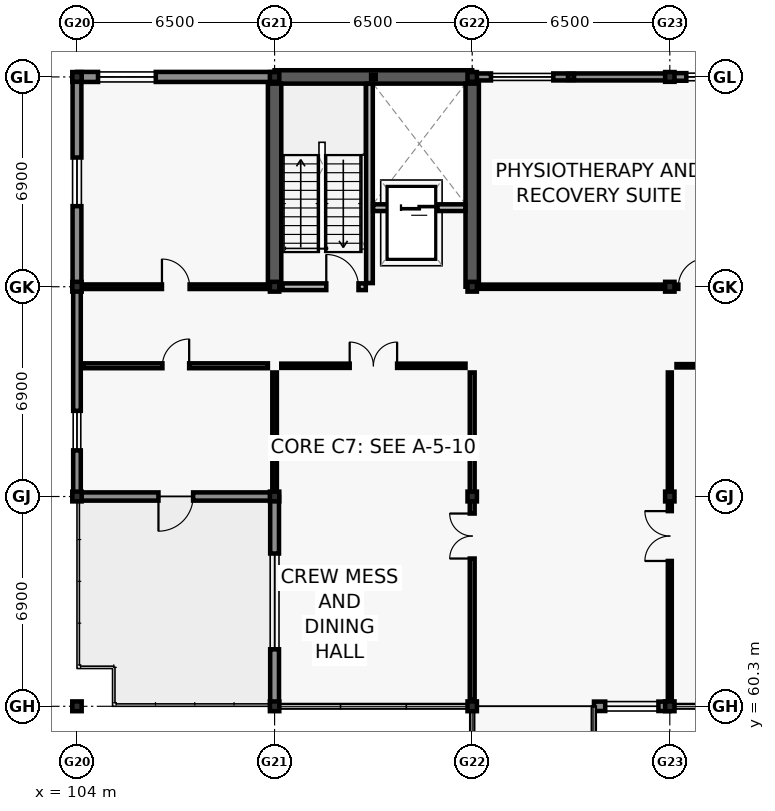
"""IFC4 building model, lengths in metres.
Left out: names, types, materials, properties, quantities, classifications, styles, units other than length and angle.
Written with IfcOpenShell. Run it as: python <this file> out.ifc"""

import sys

from ifc_helpers import new_model, si_unit, direction, frame, frame_2d, origin, origin_2d, place, context, subcontext, project, spatial, rectangle, hollow_rectangle, i_section, extrude, element, fill, save


model = new_model("IFC4")
c1 = context("Model", 3, precision=1e-05, world=origin(), true_north=direction((0.0, 1.0)))
c2 = subcontext(c1, "Body", "Model", "MODEL_VIEW")
j1 = project(units=[si_unit("LENGTHUNIT", "METRE"), si_unit("PLANEANGLEUNIT", "RADIAN")], contexts=[c1])
p1 = place(None, origin())
s1 = spatial("IfcSite", under=j1, at=p1, CompositionType="ELEMENT")
p2 = place(p1, origin())
s2 = spatial("IfcBuilding", under=s1, at=p2, CompositionType="ELEMENT")
p3 = place(p2, frame((0.0, 0.0, 5.4)))
s3 = spatial("IfcBuildingStorey", under=s2, at=p3, CompositionType="ELEMENT", Elevation=5.4)
for number, where, z_axis, x_axis in (
    (1, (104.0, 60.3, 0.0), (0.0, 0.0, 1.0), (1.0, 0.0, 0.0)),
    (2, (104.0, 67.2, 0.0), (0.0, 0.0, 1.0), (1.0, 0.0, 0.0)),
    (3, (104.0, 74.1, 0.0), (0.0, 0.0, 1.0), (1.0, 0.0, 0.0)),
    (4, (104.0, 81.0, 0.0), (0.0, 0.0, 1.0), (1.0, 0.0, 0.0)),
    (5, (110.5, 60.3, 0.0), (0.0, 0.0, 1.0), (1.0, 0.0, 0.0)),
    (6, (110.5, 67.2, 0.0), (0.0, 0.0, 1.0), (1.0, 0.0, 0.0)),
    (7, (110.5, 74.1, 0.0), (0.0, 0.0, 1.0), (1.0, 0.0, 0.0)),
    (8, (110.5, 81.0, 0.0), (0.0, 0.0, 1.0), (1.0, 0.0, 0.0)),
    (9, (117.0, 60.3, 0.0), (0.0, 0.0, 1.0), (1.0, 0.0, 0.0)),
    (10, (117.0, 67.2, 0.0), (0.0, 0.0, 1.0), (1.0, 0.0, 0.0)),
    (11, (117.0, 74.1, 0.0), (0.0, 0.0, 1.0), (1.0, 0.0, 0.0)),
    (12, (117.0, 81.0, 0.0), (0.0, 0.0, 1.0), (1.0, 0.0, 0.0)),
    (13, (123.5, 60.3, 0.0), (0.0, 0.0, 1.0), (1.0, 0.0, 0.0)),
    (14, (123.5, 67.2, 0.0), (0.0, 0.0, 1.0), (1.0, 0.0, 0.0)),
    (15, (123.5, 74.1, 0.0), (0.0, 0.0, 1.0), (1.0, 0.0, 0.0)),
    (16, (123.5, 81.0, 0.0), (0.0, 0.0, 1.0), (1.0, 0.0, 0.0)),
):
    element("IfcColumn", number, at=place(p3, frame(where, z_axis=z_axis, x_axis=x_axis)), inside=s3, PredefinedType="COLUMN", context=c2, shape_type="SweptSolid", body=[
        extrude(i_section(OverallWidth=0.309, OverallDepth=0.321, WebThickness=0.014, FlangeThickness=0.022, FilletRadius=0.017, at=origin_2d()), origin(), (0.0, 0.0, 1.0), 4.2),
    ])
p4 = place(p3, frame((113.75, 81.0, 0.0), z_axis=(0.0, 0.0, 1.0), x_axis=(1.0, 0.0, 0.0)))
e17 = element("IfcColumn", 17, at=p4, inside=s3, PredefinedType="PILASTER", context=c2, shape_type="SweptSolid", body=[
    extrude(hollow_rectangle(XDim=0.15, YDim=0.15, WallThickness=0.009, at=origin_2d()), origin(), (0.0, 0.0, 1.0), 4.2),
])
p5 = place(p3, frame((120.25, 81.0, 0.0), z_axis=(0.0, 0.0, 1.0), x_axis=(1.0, 0.0, 0.0)))
e18 = element("IfcColumn", 18, at=p5, inside=s3, PredefinedType="PILASTER", context=c2, shape_type="SweptSolid", body=[
    extrude(hollow_rectangle(XDim=0.2, YDim=0.2, WallThickness=0.01, at=origin_2d()), origin(), (0.0, 0.0, 1.0), 4.2),
])
p6 = place(p3, frame((110.5, 81.0, 0.0), z_axis=(0.0, 0.0, 1.0), x_axis=(1.0, 0.0, 0.0)))
e19 = element("IfcWall", 19, at=p6, inside=s3, PredefinedType="SHEAR", context=c2, shape_type="SweptSolid", body=[
    extrude(rectangle(XDim=6.5, YDim=0.44, at=frame_2d((3.25, 0.0))), origin(), (0.0, 0.0, 1.0), 3.96),
])
for number, where, z_axis, x_axis in (
    (20, (110.5, 74.1, 0.0), (0.0, 0.0, 1.0), (0.0, 1.0, 0.0)),
    (21, (117.0, 74.1, 0.0), (0.0, 0.0, 1.0), (0.0, 1.0, 0.0)),
):
    element("IfcWall", number, at=place(p3, frame(where, z_axis=z_axis, x_axis=x_axis)), inside=s3, PredefinedType="SHEAR", context=c2, shape_type="SweptSolid", body=[
        extrude(rectangle(XDim=6.68, YDim=0.44, at=frame_2d((3.34, 0.0))), origin(), (0.0, 0.0, 1.0), 3.96),
    ])
p7 = place(p3, frame((110.495, 67.2, 0.0), z_axis=(0.0, 0.0, 1.0), x_axis=(-1.0, 0.0, 0.0)))
e22 = element("IfcWall", 22, at=p7, inside=s3, PredefinedType="SOLIDWALL", context=c2, shape_type="SweptSolid", body=[
    extrude(rectangle(XDim=6.49, YDim=0.27, at=frame_2d((3.245, 0.0))), origin(), (0.0, 0.0, 1.0), 3.32),
])
p8 = place(p7, frame((2.675, 0.0, 0.0)))
e23 = element("IfcOpeningElement", 23, at=p8, cuts=e22, PredefinedType="OPENING", context=c2, shape_type="SweptSolid", body=[
    extrude(rectangle(XDim=1.14, YDim=2.14, at=frame_2d((0.57, 1.07))), frame((0.0, 0.145, 0.0), z_axis=(0.0, -1.0, 0.0), x_axis=(1.0, 0.0, 0.0)), (0.0, 0.0, 1.0), 0.29),
])
p9 = place(p3, frame((110.5, 60.305, 0.0), z_axis=(0.0, 0.0, 1.0), x_axis=(0.0, 1.0, 0.0)))
e24 = element("IfcWall", 24, at=p9, inside=s3, PredefinedType="SOLIDWALL", context=c2, shape_type="SweptSolid", body=[
    extrude(rectangle(XDim=6.89, YDim=0.29, at=frame_2d((3.445, 0.0))), origin(), (0.0, 0.0, 1.0), 3.32),
])
p10 = place(p9, frame((1.87, 0.0, 0.8)))
e25 = element("IfcOpeningElement", 25, at=p10, cuts=e24, PredefinedType="OPENING", context=c2, shape_type="SweptSolid", body=[
    extrude(rectangle(XDim=3.15, YDim=2.1, at=frame_2d((1.575, 1.05))), frame((0.0, 0.155, 0.0), z_axis=(0.0, -1.0, 0.0), x_axis=(1.0, 0.0, 0.0)), (0.0, 0.0, 1.0), 0.31),
])
p11 = place(p3, frame((123.495, 60.3, 0.0), z_axis=(0.0, 0.0, 1.0), x_axis=(-1.0, 0.0, 0.0)))
e26 = element("IfcWall", 26, at=p11, inside=s3, PredefinedType="SOLIDWALL", context=c2, shape_type="SweptSolid", body=[
    extrude(rectangle(XDim=2.49, YDim=0.31, at=frame_2d((1.245, 0.0))), origin(), (0.0, 0.0, 1.0), 3.32),
])
p12 = place(p11, frame((0.37, 0.0, 0.8)))
e27 = element("IfcOpeningElement", 27, at=p12, cuts=e26, PredefinedType="OPENING", context=c2, shape_type="SweptSolid", body=[
    extrude(rectangle(XDim=1.75, YDim=1.8, at=frame_2d((0.875, 0.9))), frame((0.0, 0.165, 0.0), z_axis=(0.0, -1.0, 0.0), x_axis=(1.0, 0.0, 0.0)), (0.0, 0.0, 1.0), 0.33),
])
p13 = place(p3, frame((104.005, 81.0, 0.0), z_axis=(0.0, 0.0, 1.0), x_axis=(1.0, 0.0, 0.0)))
e28 = element("IfcWall", 28, at=p13, inside=s3, PredefinedType="SOLIDWALL", context=c2, shape_type="SweptSolid", body=[
    extrude(rectangle(XDim=6.49, YDim=0.33, at=frame_2d((3.245, 0.0))), origin(), (0.0, 0.0, 1.0), 3.32),
])
p14 = place(p13, frame((0.688, 0.0, 0.8)))
e29 = element("IfcOpeningElement", 29, at=p14, cuts=e28, PredefinedType="OPENING", context=c2, shape_type="SweptSolid", body=[
    extrude(rectangle(XDim=1.9, YDim=1.8, at=frame_2d((0.95, 0.9))), frame((0.0, 0.175, 0.0), z_axis=(0.0, -1.0, 0.0), x_axis=(1.0, 0.0, 0.0)), (0.0, 0.0, 1.0), 0.35),
])
p15 = place(p3, frame((117.005, 81.0, 0.0), z_axis=(0.0, 0.0, 1.0), x_axis=(1.0, 0.0, 0.0)))
e30 = element("IfcWall", 30, at=p15, inside=s3, PredefinedType="SOLIDWALL", context=c2, shape_type="SweptSolid", body=[
    extrude(rectangle(XDim=6.49, YDim=0.23, at=frame_2d((3.245, 0.0))), origin(), (0.0, 0.0, 1.0), 3.32),
])
p16 = place(p15, frame((0.613, 0.0, 0.8)))
e31 = element("IfcOpeningElement", 31, at=p16, cuts=e30, PredefinedType="OPENING", context=c2, shape_type="SweptSolid", body=[
    extrude(rectangle(XDim=2.05, YDim=1.8, at=frame_2d((1.025, 0.9))), frame((0.0, 0.125, 0.0), z_axis=(0.0, -1.0, 0.0), x_axis=(1.0, 0.0, 0.0)), (0.0, 0.0, 1.0), 0.25),
])
p17 = place(p3, frame((123.505, 81.0, 0.0), z_axis=(0.0, 0.0, 1.0), x_axis=(1.0, 0.0, 0.0)))
e32 = element("IfcWall", 32, at=p17, inside=s3, PredefinedType="SOLIDWALL", context=c2, shape_type="SweptSolid", body=[
    extrude(rectangle(XDim=6.49, YDim=0.25, at=frame_2d((3.245, 0.0))), origin(), (0.0, 0.0, 1.0), 3.32),
])
p18 = place(p17, frame((0.538, 0.0, 0.8)))
e33 = element("IfcOpeningElement", 33, at=p18, cuts=e32, PredefinedType="OPENING", context=c2, shape_type="SweptSolid", body=[
    extrude(rectangle(XDim=2.2, YDim=1.8, at=frame_2d((1.1, 0.9))), frame((0.0, 0.135, 0.0), z_axis=(0.0, -1.0, 0.0), x_axis=(1.0, 0.0, 0.0)), (0.0, 0.0, 1.0), 0.27),
])
p19 = place(p3, frame((104.0, 67.205, 0.0), z_axis=(0.0, 0.0, 1.0), x_axis=(0.0, 1.0, 0.0)))
e34 = element("IfcWall", 34, at=p19, inside=s3, PredefinedType="SOLIDWALL", context=c2, shape_type="SweptSolid", body=[
    extrude(rectangle(XDim=6.89, YDim=0.25, at=frame_2d((3.445, 0.0))), origin(), (0.0, 0.0, 1.0), 3.32),
])
p20 = place(p19, frame((1.512, 0.0, 0.8)))
e35 = element("IfcOpeningElement", 35, at=p20, cuts=e34, PredefinedType="OPENING", context=c2, shape_type="SweptSolid", body=[
    extrude(rectangle(XDim=1.3, YDim=1.8, at=frame_2d((0.65, 0.9))), frame((0.0, 0.135, 0.0), z_axis=(0.0, -1.0, 0.0), x_axis=(1.0, 0.0, 0.0)), (0.0, 0.0, 1.0), 0.27),
])
p21 = place(p3, frame((104.0, 74.105, 0.0), z_axis=(0.0, 0.0, 1.0), x_axis=(0.0, 1.0, 0.0)))
e36 = element("IfcWall", 36, at=p21, inside=s3, PredefinedType="SOLIDWALL", context=c2, shape_type="SweptSolid", body=[
    extrude(rectangle(XDim=6.89, YDim=0.29, at=frame_2d((3.445, 0.0))), origin(), (0.0, 0.0, 1.0), 3.32),
])
p22 = place(p21, frame((2.645, 0.0, 0.8)))
e37 = element("IfcOpeningElement", 37, at=p22, cuts=e36, PredefinedType="OPENING", context=c2, shape_type="SweptSolid", body=[
    extrude(rectangle(XDim=1.6, YDim=1.8, at=frame_2d((0.8, 0.9))), frame((0.0, 0.155, 0.0), z_axis=(0.0, -1.0, 0.0), x_axis=(1.0, 0.0, 0.0)), (0.0, 0.0, 1.0), 0.31),
])
p23 = place(p3, frame((113.62, 74.22, 0.0), z_axis=(0.0, 0.0, 1.0), x_axis=(0.0, 1.0, 0.0)))
e38 = element("IfcWall", 38, at=p23, inside=s3, PredefinedType="SOLIDWALL", context=c2, shape_type="SweptSolid", body=[
    extrude(rectangle(XDim=6.555, YDim=0.22, at=frame_2d((3.277, 0.0))), origin(), (0.0, 0.0, 1.0), 3.96),
])
p24 = place(p3, frame((110.76, 74.1, 0.0), z_axis=(0.0, 0.0, 1.0), x_axis=(1.0, 0.0, 0.0)))
e39 = element("IfcWall", 39, at=p24, inside=s3, PredefinedType="SOLIDWALL", context=c2, shape_type="SweptSolid", body=[
    extrude(rectangle(XDim=2.74, YDim=0.22, at=frame_2d((1.37, 0.0))), origin(), (0.0, 0.0, 1.0), 3.32),
])
p25 = place(p24, frame((1.44, 0.0, 0.0)))
e40 = element("IfcOpeningElement", 40, at=p25, cuts=e39, PredefinedType="OPENING", context=c2, shape_type="SweptSolid", body=[
    extrude(rectangle(XDim=1.06, YDim=2.1, at=frame_2d((0.53, 1.05))), frame((0.0, 0.12, 0.0), z_axis=(0.0, -1.0, 0.0), x_axis=(1.0, 0.0, 0.0)), (0.0, 0.0, 1.0), 0.24),
])
p26 = place(p3, frame((113.74, 76.7, 0.0), z_axis=(0.0, 0.0, 1.0), x_axis=(1.0, 0.0, 0.0)))
e41 = element("IfcWall", 41, at=p26, inside=s3, PredefinedType="SOLIDWALL", context=c2, shape_type="SweptSolid", body=[
    extrude(rectangle(XDim=3.035, YDim=0.22, at=frame_2d((1.518, 0.0))), origin(), (0.0, 0.0, 1.0), 3.96),
])
p27 = place(p26, frame((0.917, 0.0, 0.0)))
e42 = element("IfcOpeningElement", 42, at=p27, cuts=e41, PredefinedType="OPENING", context=c2, shape_type="SweptSolid", body=[
    extrude(rectangle(XDim=1.2, YDim=2.15, at=frame_2d((0.6, 1.075))), frame((0.0, 0.12, 0.0), z_axis=(0.0, -1.0, 0.0), x_axis=(1.0, 0.0, 0.0)), (0.0, 0.0, 1.0), 0.24),
])
p28 = place(p3, frame((117.0, 60.52, 0.0), z_axis=(0.0, 0.0, 1.0), x_axis=(0.0, 1.0, 0.0)))
e43 = element("IfcWall", 43, at=p28, inside=s3, PredefinedType="PARTITIONING", context=c2, shape_type="SweptSolid", body=[
    extrude(rectangle(XDim=10.76, YDim=0.16, at=frame_2d((5.38, 0.0))), origin(), (0.0, 0.0, 1.0), 3.3),
])
p29 = place(p28, frame((4.64, 0.0, 0.0)))
e44 = element("IfcOpeningElement", 44, at=p29, cuts=e43, PredefinedType="OPENING", context=c2, shape_type="SweptSolid", body=[
    extrude(rectangle(XDim=1.48, YDim=2.18, at=frame_2d((0.74, 1.09))), frame((0.0, 0.09, 0.0), z_axis=(0.0, -1.0, 0.0), x_axis=(1.0, 0.0, 0.0)), (0.0, 0.0, 1.0), 0.18),
])
p30 = place(p3, frame((110.5, 67.42, 0.0), z_axis=(0.0, 0.0, 1.0), x_axis=(0.0, 1.0, 0.0)))
e45 = element("IfcWall", 45, at=p30, inside=s3, PredefinedType="PARTITIONING", context=c2, shape_type="SweptSolid", body=[
    extrude(rectangle(XDim=3.86, YDim=0.15, at=frame_2d((1.93, 0.0))), origin(), (0.0, 0.0, 1.0), 3.3),
])
p31 = place(p3, frame((110.72, 71.5, 0.0), z_axis=(0.0, 0.0, 1.0), x_axis=(1.0, 0.0, 0.0)))
e46 = element("IfcWall", 46, at=p31, inside=s3, PredefinedType="PARTITIONING", context=c2, shape_type="SweptSolid", body=[
    extrude(rectangle(XDim=6.06, YDim=0.14, at=frame_2d((3.03, 0.0))), origin(), (0.0, 0.0, 1.0), 3.3),
])
p32 = place(p31, frame((2.25, 0.0, 0.0)))
e47 = element("IfcOpeningElement", 47, at=p32, cuts=e46, PredefinedType="OPENING", context=c2, shape_type="SweptSolid", body=[
    extrude(rectangle(XDim=1.56, YDim=2.18, at=frame_2d((0.78, 1.09))), frame((0.0, 0.08, 0.0), z_axis=(0.0, -1.0, 0.0), x_axis=(1.0, 0.0, 0.0)), (0.0, 0.0, 1.0), 0.16),
])
p33 = place(p3, frame((123.5, 60.52, 0.0), z_axis=(0.0, 0.0, 1.0), x_axis=(0.0, 1.0, 0.0)))
e48 = element("IfcWall", 48, at=p33, inside=s3, PredefinedType="PARTITIONING", context=c2, shape_type="SweptSolid", body=[
    extrude(rectangle(XDim=10.76, YDim=0.13, at=frame_2d((5.38, 0.0))), origin(), (0.0, 0.0, 1.0), 3.3),
])
p34 = place(p33, frame((4.56, 0.0, 0.0)))
e49 = element("IfcOpeningElement", 49, at=p34, cuts=e48, PredefinedType="OPENING", context=c2, shape_type="SweptSolid", body=[
    extrude(rectangle(XDim=1.64, YDim=2.2, at=frame_2d((0.82, 1.1))), frame((0.0, 0.075, 0.0), z_axis=(0.0, -1.0, 0.0), x_axis=(1.0, 0.0, 0.0)), (0.0, 0.0, 1.0), 0.15),
])
p35 = place(p3, frame((123.72, 71.5, 0.0), z_axis=(0.0, 0.0, 1.0), x_axis=(1.0, 0.0, 0.0)))
e50 = element("IfcWall", 50, at=p35, inside=s3, PredefinedType="PARTITIONING", context=c2, shape_type="SweptSolid", body=[
    extrude(rectangle(XDim=19.06, YDim=0.11, at=frame_2d((9.53, 0.0))), origin(), (0.0, 0.0, 1.0), 3.3),
])
p36 = place(p35, frame((8.66, 0.0, 0.0)))
e51 = element("IfcOpeningElement", 51, at=p36, cuts=e50, PredefinedType="OPENING", context=c2, shape_type="SweptSolid", body=[
    extrude(rectangle(XDim=1.74, YDim=2.2, at=frame_2d((0.87, 1.1))), frame((0.0, 0.065, 0.0), z_axis=(0.0, -1.0, 0.0), x_axis=(1.0, 0.0, 0.0)), (0.0, 0.0, 1.0), 0.13),
])
p37 = place(p3, frame((104.22, 71.5, 0.0), z_axis=(0.0, 0.0, 1.0), x_axis=(1.0, 0.0, 0.0)))
e52 = element("IfcWall", 52, at=p37, inside=s3, PredefinedType="PARTITIONING", context=c2, shape_type="SweptSolid", body=[
    extrude(rectangle(XDim=6.06, YDim=0.16, at=frame_2d((3.03, 0.0))), origin(), (0.0, 0.0, 1.0), 3.3),
])
p38 = place(p37, frame((2.59, 0.0, 0.0)))
e53 = element("IfcOpeningElement", 53, at=p38, cuts=e52, PredefinedType="OPENING", context=c2, shape_type="SweptSolid", body=[
    extrude(rectangle(XDim=0.88, YDim=2.04, at=frame_2d((0.44, 1.02))), frame((0.0, 0.09, 0.0), z_axis=(0.0, -1.0, 0.0), x_axis=(1.0, 0.0, 0.0)), (0.0, 0.0, 1.0), 0.18),
])
p39 = place(p3, frame((104.22, 74.1, 0.0), z_axis=(0.0, 0.0, 1.0), x_axis=(1.0, 0.0, 0.0)))
e54 = element("IfcWall", 54, at=p39, inside=s3, PredefinedType="PARTITIONING", context=c2, shape_type="SweptSolid", body=[
    extrude(rectangle(XDim=6.06, YDim=0.15, at=frame_2d((3.03, 0.0))), origin(), (0.0, 0.0, 1.0), 3.3),
])
p40 = place(p39, frame((2.575, 0.0, 0.0)))
e55 = element("IfcOpeningElement", 55, at=p40, cuts=e54, PredefinedType="OPENING", context=c2, shape_type="SweptSolid", body=[
    extrude(rectangle(XDim=0.91, YDim=2.06, at=frame_2d((0.455, 1.03))), frame((0.0, 0.085, 0.0), z_axis=(0.0, -1.0, 0.0), x_axis=(1.0, 0.0, 0.0)), (0.0, 0.0, 1.0), 0.17),
])
p41 = place(p3, frame((117.22, 74.1, 0.0), z_axis=(0.0, 0.0, 1.0), x_axis=(1.0, 0.0, 0.0)))
e56 = element("IfcWall", 56, at=p41, inside=s3, PredefinedType="PARTITIONING", context=c2, shape_type="SweptSolid", body=[
    extrude(rectangle(XDim=12.56, YDim=0.14, at=frame_2d((6.28, 0.0))), origin(), (0.0, 0.0, 1.0), 3.3),
])
p42 = place(p41, frame((6.56, 0.0, 0.0)))
e57 = element("IfcOpeningElement", 57, at=p42, cuts=e56, PredefinedType="OPENING", context=c2, shape_type="SweptSolid", body=[
    extrude(rectangle(XDim=0.94, YDim=2.08, at=frame_2d((0.47, 1.04))), frame((0.0, 0.08, 0.0), z_axis=(0.0, -1.0, 0.0), x_axis=(1.0, 0.0, 0.0)), (0.0, 0.0, 1.0), 0.16),
])
p43 = place(p8, origin())
e58 = element("IfcDoor", 58, at=p43, inside=s3, OperationType="SINGLE_SWING_RIGHT", PredefinedType="DOOR", context=c2, shape_type="SweptSolid", body=[
    extrude(rectangle(XDim=1.14, YDim=2.14, at=frame_2d((0.57, 1.07))), frame((0.0, 0.025, 0.0), z_axis=(0.0, -1.0, 0.0), x_axis=(1.0, 0.0, 0.0)), (0.0, 0.0, 1.0), 0.05),
])
fill(e23, e58)
p44 = place(p10, origin())
e59 = element("IfcWindow", 59, at=p44, inside=s3, PartitioningType="TRIPLE_PANEL_VERTICAL", PredefinedType="WINDOW", context=c2, shape_type="SweptSolid", body=[
    extrude(rectangle(XDim=3.15, YDim=2.1, at=frame_2d((1.575, 1.05))), frame((0.0, 0.03, 0.0), z_axis=(0.0, -1.0, 0.0), x_axis=(1.0, 0.0, 0.0)), (0.0, 0.0, 1.0), 0.06),
])
fill(e25, e59)
p45 = place(p12, origin())
e60 = element("IfcWindow", 60, at=p45, inside=s3, PartitioningType="DOUBLE_PANEL_VERTICAL", PredefinedType="WINDOW", context=c2, shape_type="SweptSolid", body=[
    extrude(rectangle(XDim=1.75, YDim=1.8, at=frame_2d((0.875, 0.9))), frame((0.0, 0.03, 0.0), z_axis=(0.0, -1.0, 0.0), x_axis=(1.0, 0.0, 0.0)), (0.0, 0.0, 1.0), 0.06),
])
fill(e27, e60)
p46 = place(p14, origin())
e61 = element("IfcWindow", 61, at=p46, inside=s3, PartitioningType="DOUBLE_PANEL_VERTICAL", PredefinedType="WINDOW", context=c2, shape_type="SweptSolid", body=[
    extrude(rectangle(XDim=1.9, YDim=1.8, at=frame_2d((0.95, 0.9))), frame((0.0, 0.03, 0.0), z_axis=(0.0, -1.0, 0.0), x_axis=(1.0, 0.0, 0.0)), (0.0, 0.0, 1.0), 0.06),
])
fill(e29, e61)
p47 = place(p16, origin())
e62 = element("IfcWindow", 62, at=p47, inside=s3, PartitioningType="DOUBLE_PANEL_VERTICAL", PredefinedType="WINDOW", context=c2, shape_type="SweptSolid", body=[
    extrude(rectangle(XDim=2.05, YDim=1.8, at=frame_2d((1.025, 0.9))), frame((0.0, 0.03, 0.0), z_axis=(0.0, -1.0, 0.0), x_axis=(1.0, 0.0, 0.0)), (0.0, 0.0, 1.0), 0.06),
])
fill(e31, e62)
p48 = place(p18, origin())
e63 = element("IfcWindow", 63, at=p48, inside=s3, PartitioningType="DOUBLE_PANEL_VERTICAL", PredefinedType="WINDOW", context=c2, shape_type="SweptSolid", body=[
    extrude(rectangle(XDim=2.2, YDim=1.8, at=frame_2d((1.1, 0.9))), frame((0.0, 0.03, 0.0), z_axis=(0.0, -1.0, 0.0), x_axis=(1.0, 0.0, 0.0)), (0.0, 0.0, 1.0), 0.06),
])
fill(e33, e63)
p49 = place(p20, origin())
e64 = element("IfcWindow", 64, at=p49, inside=s3, PartitioningType="SINGLE_PANEL", PredefinedType="WINDOW", context=c2, shape_type="SweptSolid", body=[
    extrude(rectangle(XDim=1.3, YDim=1.8, at=frame_2d((0.65, 0.9))), frame((0.0, 0.03, 0.0), z_axis=(0.0, -1.0, 0.0), x_axis=(1.0, 0.0, 0.0)), (0.0, 0.0, 1.0), 0.06),
])
fill(e35, e64)
p50 = place(p22, origin())
e65 = element("IfcWindow", 65, at=p50, inside=s3, PartitioningType="DOUBLE_PANEL_VERTICAL", PredefinedType="WINDOW", context=c2, shape_type="SweptSolid", body=[
    extrude(rectangle(XDim=1.6, YDim=1.8, at=frame_2d((0.8, 0.9))), frame((0.0, 0.03, 0.0), z_axis=(0.0, -1.0, 0.0), x_axis=(1.0, 0.0, 0.0)), (0.0, 0.0, 1.0), 0.06),
])
fill(e37, e65)
p51 = place(p25, origin())
e66 = element("IfcDoor", 66, at=p51, inside=s3, OperationType="SINGLE_SWING_LEFT", PredefinedType="DOOR", context=c2, shape_type="SweptSolid", body=[
    extrude(rectangle(XDim=1.06, YDim=2.1, at=frame_2d((0.53, 1.05))), frame((0.0, 0.025, 0.0), z_axis=(0.0, -1.0, 0.0), x_axis=(1.0, 0.0, 0.0)), (0.0, 0.0, 1.0), 0.05),
])
fill(e40, e66)
p52 = place(p27, origin())
e67 = element("IfcDoor", 67, at=p52, inside=s3, OperationType="DOUBLE_DOOR_SLIDING", PredefinedType="DOOR", context=c2, shape_type="SweptSolid", body=[
    extrude(rectangle(XDim=1.2, YDim=2.15, at=frame_2d((0.6, 1.075))), frame((0.0, 0.025, 0.0), z_axis=(0.0, -1.0, 0.0), x_axis=(1.0, 0.0, 0.0)), (0.0, 0.0, 1.0), 0.05),
])
fill(e42, e67)
p53 = place(p29, origin())
e68 = element("IfcDoor", 68, at=p53, inside=s3, OperationType="DOUBLE_DOOR_SINGLE_SWING", PredefinedType="DOOR", context=c2, shape_type="SweptSolid", body=[
    extrude(rectangle(XDim=1.48, YDim=2.18, at=frame_2d((0.74, 1.09))), frame((0.0, 0.025, 0.0), z_axis=(0.0, -1.0, 0.0), x_axis=(1.0, 0.0, 0.0)), (0.0, 0.0, 1.0), 0.05),
])
fill(e44, e68)
p54 = place(p32, origin())
e69 = element("IfcDoor", 69, at=p54, inside=s3, OperationType="DOUBLE_DOOR_SINGLE_SWING", PredefinedType="DOOR", context=c2, shape_type="SweptSolid", body=[
    extrude(rectangle(XDim=1.56, YDim=2.18, at=frame_2d((0.78, 1.09))), frame((0.0, 0.025, 0.0), z_axis=(0.0, -1.0, 0.0), x_axis=(1.0, 0.0, 0.0)), (0.0, 0.0, 1.0), 0.05),
])
fill(e47, e69)
p55 = place(p34, origin())
e70 = element("IfcDoor", 70, at=p55, inside=s3, OperationType="DOUBLE_DOOR_SINGLE_SWING", PredefinedType="DOOR", context=c2, shape_type="SweptSolid", body=[
    extrude(rectangle(XDim=1.64, YDim=2.2, at=frame_2d((0.82, 1.1))), frame((0.0, 0.025, 0.0), z_axis=(0.0, -1.0, 0.0), x_axis=(1.0, 0.0, 0.0)), (0.0, 0.0, 1.0), 0.05),
])
fill(e49, e70)
p56 = place(p38, origin())
e71 = element("IfcDoor", 71, at=p56, inside=s3, OperationType="SINGLE_SWING_RIGHT", PredefinedType="DOOR", context=c2, shape_type="SweptSolid", body=[
    extrude(rectangle(XDim=0.88, YDim=2.04, at=frame_2d((0.44, 1.02))), frame((0.0, 0.025, 0.0), z_axis=(0.0, -1.0, 0.0), x_axis=(1.0, 0.0, 0.0)), (0.0, 0.0, 1.0), 0.05),
])
fill(e53, e71)
p57 = place(p40, origin())
e72 = element("IfcDoor", 72, at=p57, inside=s3, OperationType="SINGLE_SWING_LEFT", PredefinedType="DOOR", context=c2, shape_type="SweptSolid", body=[
    extrude(rectangle(XDim=0.91, YDim=2.06, at=frame_2d((0.455, 1.03))), frame((0.0, 0.025, 0.0), z_axis=(0.0, -1.0, 0.0), x_axis=(1.0, 0.0, 0.0)), (0.0, 0.0, 1.0), 0.05),
])
fill(e55, e72)
p58 = place(p42, origin())
e73 = element("IfcDoor", 73, at=p58, inside=s3, OperationType="SINGLE_SWING_RIGHT", PredefinedType="DOOR", context=c2, shape_type="SweptSolid", body=[
    extrude(rectangle(XDim=0.94, YDim=2.08, at=frame_2d((0.47, 1.04))), frame((0.0, 0.025, 0.0), z_axis=(0.0, -1.0, 0.0), x_axis=(1.0, 0.0, 0.0)), (0.0, 0.0, 1.0), 0.05),
])
fill(e57, e73)
save(model, sys.argv[1])
